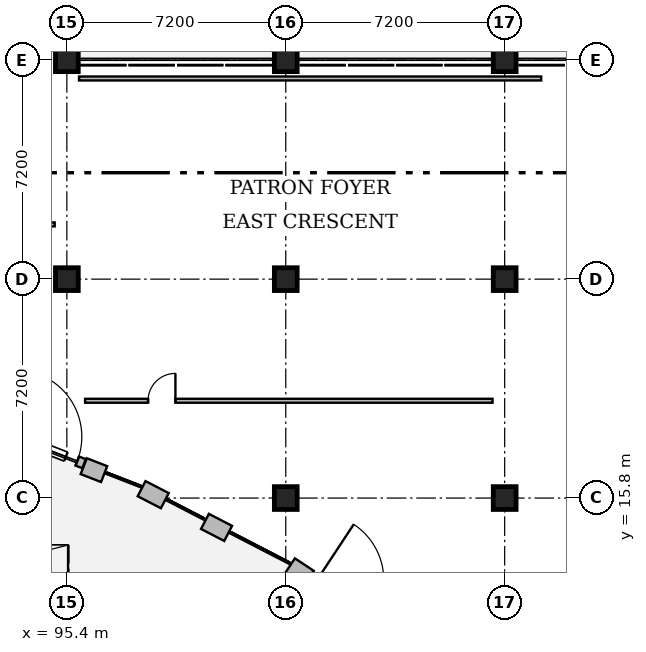
"""IFC4 building model, lengths in metres.
Left out: names, types, materials, properties, quantities, classifications, styles, units other than length and angle.
Written with IfcOpenShell. Run it as: python <this file> out.ifc"""

import sys

from ifc_helpers import new_model, si_unit, direction, frame, frame_2d, origin, origin_2d, place, context, subcontext, project, spatial, rectangle, circle, extrude, element, fill, save


model = new_model("IFC4")
c1 = context("Model", 3, precision=1e-05, world=origin(), true_north=direction((0.0, 1.0)))
c2 = subcontext(c1, "Body", "Model", "MODEL_VIEW")
j1 = project(units=[si_unit("LENGTHUNIT", "METRE"), si_unit("PLANEANGLEUNIT", "RADIAN")], contexts=[c1])
p1 = place(None, origin())
s1 = spatial("IfcSite", under=j1, at=p1, CompositionType="ELEMENT")
p2 = place(p1, origin())
s2 = spatial("IfcBuilding", under=s1, at=p2, CompositionType="ELEMENT")
p3 = place(p2, origin())
s3 = spatial("IfcBuildingStorey", under=s2, at=p3, CompositionType="ELEMENT", Elevation=0.0)
for number, where, z_axis, x_axis in (
    (1, (95.4, 23.0, 0.0), (0.0, 0.0, 1.0), (1.0, 0.0, 0.0)),
    (2, (95.4, 30.2, 0.0), (0.0, 0.0, 1.0), (1.0, 0.0, 0.0)),
    (3, (102.6, 15.8, 0.0), (0.0, 0.0, 1.0), (1.0, 0.0, 0.0)),
    (4, (102.6, 23.0, 0.0), (0.0, 0.0, 1.0), (1.0, 0.0, 0.0)),
    (5, (102.6, 30.2, 0.0), (0.0, 0.0, 1.0), (1.0, 0.0, 0.0)),
    (6, (109.8, 15.8, 0.0), (0.0, 0.0, 1.0), (1.0, 0.0, 0.0)),
    (7, (109.8, 23.0, 0.0), (0.0, 0.0, 1.0), (1.0, 0.0, 0.0)),
    (8, (109.8, 30.2, 0.0), (0.0, 0.0, 1.0), (1.0, 0.0, 0.0)),
):
    element("IfcColumn", number, at=place(p3, frame(where, z_axis=z_axis, x_axis=x_axis)), inside=s3, PredefinedType="COLUMN", context=c2, shape_type="SweptSolid", body=[
        extrude(circle(Radius=0.375, at=origin_2d()), origin(), (0.0, 0.0, 1.0), 4.8),
    ])
p4 = place(p3, frame((95.956, 16.848, 0.0), z_axis=(0.0, 0.0, 1.0), x_axis=(0.931966478623, -0.362544456204, 0.0)))
e9 = element("IfcWall", 9, at=p4, inside=s3, PredefinedType="SOLIDWALL", context=c2, shape_type="SweptSolid", body=[
    extrude(rectangle(XDim=0.72, YDim=0.56, at=frame_2d((0.36, 0.0))), origin(), (0.0, 0.0, 1.0), 4.54),
])
p5 = place(p3, frame((93.468, 17.902, 0.0), z_axis=(0.0, 0.0, 1.0), x_axis=(0.931984153545, -0.362499017298, 0.0)))
e10 = element("IfcWall", 10, at=p5, inside=s3, PredefinedType="SOLIDWALL", context=c2, shape_type="SweptSolid", body=[
    extrude(rectangle(XDim=2.68, YDim=0.32, at=frame_2d((1.34, 0.0))), origin(), (0.0, 0.0, 1.0), 4.54),
])
p6 = place(p5, frame((0.64, 0.0, 2.58)))
e11 = element("IfcOpeningElement", 11, at=p6, cuts=e10, PredefinedType="OPENING", context=c2, shape_type="SweptSolid", body=[
    extrude(rectangle(XDim=1.4, YDim=1.8, at=frame_2d((0.7, 0.9))), frame((0.0, 0.18, 0.0), z_axis=(0.0, -1.0, 0.0), x_axis=(1.0, 0.0, 0.0)), (0.0, 0.0, 1.0), 0.36),
])
p7 = place(p5, frame((0.24, 0.0, 0.0)))
e12 = element("IfcOpeningElement", 12, at=p7, cuts=e10, PredefinedType="OPENING", context=c2, shape_type="SweptSolid", body=[
    extrude(rectangle(XDim=2.2, YDim=2.5, at=frame_2d((1.1, 1.25))), frame((0.0, 0.18, 0.0), z_axis=(0.0, -1.0, 0.0), x_axis=(1.0, 0.0, 0.0)), (0.0, 0.0, 1.0), 0.36),
])
for number, where, z_axis, x_axis in (
    (13, (97.858, 16.109, 0.0), (0.0, 0.0, 1.0), (0.888, -0.459, 0.0)),
    (14, (99.941, 15.032, 0.0), (0.0, 0.0, 1.0), (0.888, -0.459, 0.0)),
):
    element("IfcWall", number, at=place(p3, frame(where, z_axis=z_axis, x_axis=x_axis)), inside=s3, PredefinedType="SOLIDWALL", context=c2, shape_type="SweptSolid", body=[
        extrude(rectangle(XDim=0.86, YDim=0.56, at=frame_2d((0.43, 0.0))), origin(), (0.0, 0.0, 1.0), 4.54),
    ])
p8 = place(p3, frame((102.746, 13.583, 0.0), z_axis=(0.0, 0.0, 1.0), x_axis=(0.834882382665, -0.550428385093, 0.0)))
e15 = element("IfcWall", 15, at=p8, inside=s3, PredefinedType="SOLIDWALL", context=c2, shape_type="SweptSolid", body=[
    extrude(rectangle(XDim=0.74, YDim=0.56, at=frame_2d((0.37, 0.0))), origin(), (0.0, 0.0, 1.0), 4.54),
])
p9 = place(p3, frame((103.424, 13.231, 0.0), z_axis=(0.0, 0.0, 1.0), x_axis=(0.834786932097, -0.550573135923, 0.0)))
e16 = element("IfcWall", 16, at=p9, inside=s3, PredefinedType="SOLIDWALL", context=c2, shape_type="SweptSolid", body=[
    extrude(rectangle(XDim=2.68, YDim=0.32, at=frame_2d((1.34, 0.0))), origin(), (0.0, 0.0, 1.0), 4.54),
])
p10 = place(p9, frame((0.64, 0.0, 2.58)))
e17 = element("IfcOpeningElement", 17, at=p10, cuts=e16, PredefinedType="OPENING", context=c2, shape_type="SweptSolid", body=[
    extrude(rectangle(XDim=1.4, YDim=1.8, at=frame_2d((0.7, 0.9))), frame((0.0, 0.18, 0.0), z_axis=(0.0, -1.0, 0.0), x_axis=(1.0, 0.0, 0.0)), (0.0, 0.0, 1.0), 0.36),
])
p11 = place(p9, frame((0.24, 0.0, 0.0)))
e18 = element("IfcOpeningElement", 18, at=p11, cuts=e16, PredefinedType="OPENING", context=c2, shape_type="SweptSolid", body=[
    extrude(rectangle(XDim=2.2, YDim=2.5, at=frame_2d((1.1, 1.25))), frame((0.0, 0.18, 0.0), z_axis=(0.0, -1.0, 0.0), x_axis=(1.0, 0.0, 0.0)), (0.0, 0.0, 1.0), 0.36),
])
p12 = place(p3, frame((95.8, 29.6, 0.0), z_axis=(0.0, 0.0, 1.0), x_axis=(1.0, 0.0, 0.0)))
e19 = element("IfcWall", 19, at=p12, inside=s3, PredefinedType="PARTITIONING", context=c2, shape_type="SweptSolid", body=[
    extrude(rectangle(XDim=15.2, YDim=0.13, at=frame_2d((7.6, 0.0))), origin(), (0.0, 0.0, 1.0), 4.54),
])
p13 = place(p3, frame((96.0, 19.0, 0.0), z_axis=(0.0, 0.0, 1.0), x_axis=(1.0, 0.0, 0.0)))
e20 = element("IfcWall", 20, at=p13, inside=s3, PredefinedType="PARTITIONING", context=c2, shape_type="SweptSolid", body=[
    extrude(rectangle(XDim=13.4, YDim=0.13, at=frame_2d((6.7, 0.0))), origin(), (0.0, 0.0, 1.0), 4.54),
])
p14 = place(p13, frame((2.071, 0.0, 0.0)))
e21 = element("IfcOpeningElement", 21, at=p14, cuts=e20, PredefinedType="OPENING", context=c2, shape_type="SweptSolid", body=[
    extrude(rectangle(XDim=0.9, YDim=2.15, at=frame_2d((0.45, 1.075))), frame((0.0, 0.085, 0.0), z_axis=(0.0, -1.0, 0.0), x_axis=(1.0, 0.0, 0.0)), (0.0, 0.0, 1.0), 0.17),
])
p15 = place(p3, frame((57.8, 24.8, 0.0), z_axis=(0.0, 0.0, 1.0), x_axis=(1.0, 0.0, 0.0)))
e22 = element("IfcWall", 22, at=p15, inside=s3, PredefinedType="PARTITIONING", context=c2, shape_type="SweptSolid", body=[
    extrude(rectangle(XDim=37.2, YDim=0.13, at=frame_2d((18.6, 0.0))), origin(), (0.0, 0.0, 1.0), 4.54),
])
p16 = place(p15, frame((15.265, 0.0, 0.0)))
e23 = element("IfcOpeningElement", 23, at=p16, cuts=e22, PredefinedType="OPENING", context=c2, shape_type="SweptSolid", body=[
    extrude(rectangle(XDim=1.45, YDim=2.2, at=frame_2d((0.725, 1.1))), frame((0.0, 0.085, 0.0), z_axis=(0.0, -1.0, 0.0), x_axis=(1.0, 0.0, 0.0)), (0.0, 0.0, 1.0), 0.17),
])
p17 = place(p6, origin())
e24 = element("IfcWindow", 24, at=p17, inside=s3, PartitioningType="SINGLE_PANEL", PredefinedType="WINDOW", context=c2, shape_type="SweptSolid", body=[
    extrude(rectangle(XDim=1.4, YDim=1.8, at=frame_2d((0.7, 0.9))), frame((0.0, 0.03, 0.0), z_axis=(0.0, -1.0, 0.0), x_axis=(1.0, 0.0, 0.0)), (0.0, 0.0, 1.0), 0.06),
])
fill(e11, e24)
p18 = place(p7, origin())
e25 = element("IfcDoor", 25, at=p18, inside=s3, OperationType="SINGLE_SWING_LEFT", PredefinedType="DOOR", context=c2, shape_type="SweptSolid", body=[
    extrude(rectangle(XDim=2.2, YDim=2.5, at=frame_2d((1.1, 1.25))), frame((0.0, 0.025, 0.0), z_axis=(0.0, -1.0, 0.0), x_axis=(1.0, 0.0, 0.0)), (0.0, 0.0, 1.0), 0.05),
])
fill(e12, e25)
p19 = place(p14, origin())
e26 = element("IfcDoor", 26, at=p19, inside=s3, OperationType="SINGLE_SWING_RIGHT", PredefinedType="DOOR", context=c2, shape_type="SweptSolid", body=[
    extrude(rectangle(XDim=0.9, YDim=2.15, at=frame_2d((0.45, 1.075))), frame((0.0, 0.025, 0.0), z_axis=(0.0, -1.0, 0.0), x_axis=(1.0, 0.0, 0.0)), (0.0, 0.0, 1.0), 0.05),
])
fill(e21, e26)
save(model, sys.argv[1])
